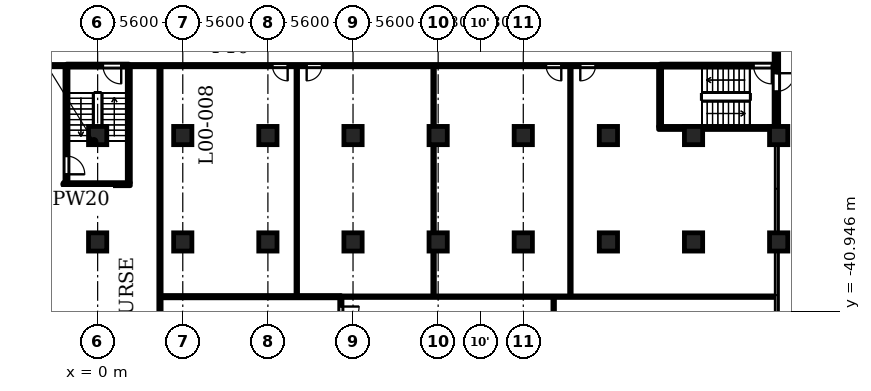
"""IFC4 building model, lengths in metres.
Left out: names, types, materials, properties, quantities, classifications, styles, units other than length and angle.
Written with IfcOpenShell. Run it as: python <this file> out.ifc"""

import sys

from ifc_helpers import new_model, si_unit, direction, frame, frame_2d, origin, origin_2d, place, context, subcontext, project, spatial, rectangle, circle, extrude, element, fill, save


model = new_model("IFC4")
c1 = context("Model", 3, precision=1e-05, world=origin(), true_north=direction((0.0, 1.0)))
c2 = subcontext(c1, "Body", "Model", "MODEL_VIEW")
j1 = project(units=[si_unit("LENGTHUNIT", "METRE"), si_unit("PLANEANGLEUNIT", "RADIAN")], contexts=[c1])
p1 = place(None, origin())
s1 = spatial("IfcSite", under=j1, at=p1, CompositionType="ELEMENT")
p2 = place(p1, origin())
s2 = spatial("IfcBuilding", under=s1, at=p2, CompositionType="ELEMENT")
p3 = place(p2, origin())
s3 = spatial("IfcBuildingStorey", under=s2, at=p3, CompositionType="ELEMENT", Elevation=0.0)
for number, where, z_axis, x_axis in (
    (1, (0.0, -29.4, 0.0), (0.0, 0.0, 1.0), (1.0, 0.0, 0.0)),
    (2, (5.6, -29.4, 0.0), (0.0, 0.0, 1.0), (1.0, 0.0, 0.0)),
    (3, (11.2, -29.4, 0.0), (0.0, 0.0, 1.0), (1.0, 0.0, 0.0)),
    (4, (16.8, -29.4, 0.0), (0.0, 0.0, 1.0), (1.0, 0.0, 0.0)),
    (5, (22.4, -29.4, 0.0), (0.0, 0.0, 1.0), (1.0, 0.0, 0.0)),
    (6, (28.0, -29.4, 0.0), (0.0, 0.0, 1.0), (1.0, 0.0, 0.0)),
    (7, (33.6, -29.4, 0.0), (0.0, 0.0, 1.0), (1.0, 0.0, 0.0)),
    (8, (39.2, -29.4, 0.0), (0.0, 0.0, 1.0), (1.0, 0.0, 0.0)),
    (9, (44.8, -29.4, 0.0), (0.0, 0.0, 1.0), (1.0, 0.0, 0.0)),
    (10, (0.0, -36.4, 0.0), (0.0, 0.0, 1.0), (1.0, 0.0, 0.0)),
    (11, (5.6, -36.4, 0.0), (0.0, 0.0, 1.0), (1.0, 0.0, 0.0)),
    (12, (11.2, -36.4, 0.0), (0.0, 0.0, 1.0), (1.0, 0.0, 0.0)),
    (13, (16.8, -36.4, 0.0), (0.0, 0.0, 1.0), (1.0, 0.0, 0.0)),
    (14, (22.4, -36.4, 0.0), (0.0, 0.0, 1.0), (1.0, 0.0, 0.0)),
    (15, (28.0, -36.4, 0.0), (0.0, 0.0, 1.0), (1.0, 0.0, 0.0)),
    (16, (33.6, -36.4, 0.0), (0.0, 0.0, 1.0), (1.0, 0.0, 0.0)),
    (17, (39.2, -36.4, 0.0), (0.0, 0.0, 1.0), (1.0, 0.0, 0.0)),
    (18, (44.8, -36.4, 0.0), (0.0, 0.0, 1.0), (1.0, 0.0, 0.0)),
):
    element("IfcColumn", number, at=place(p3, frame(where, z_axis=z_axis, x_axis=x_axis)), inside=s3, PredefinedType="COLUMN", context=c2, shape_type="SweptSolid", body=[
        extrude(circle(Radius=0.6, at=origin_2d()), origin(), (0.0, 0.0, 1.0), 6.5),
    ])
p4 = place(p3, frame((44.65, -23.0, 0.0), z_axis=(0.0, 0.0, 1.0), x_axis=(0.0, -1.0, 0.0)))
e19 = element("IfcWall", 19, at=p4, inside=s3, PredefinedType="SOLIDWALL", context=c2, shape_type="SweptSolid", body=[
    extrude(rectangle(XDim=5.8, YDim=0.3, at=frame_2d((2.9, 0.0))), origin(), (0.0, 0.0, 1.0), 5.35),
])
p5 = place(p4, frame((2.3, 0.0, 0.0)))
e20 = element("IfcOpeningElement", 20, at=p5, cuts=e19, PredefinedType="OPENING", context=c2, shape_type="SweptSolid", body=[
    extrude(rectangle(XDim=1.2, YDim=2.1, at=frame_2d((0.6, 1.05))), frame((0.0, 0.16, 0.0), z_axis=(0.0, -1.0, 0.0), x_axis=(1.0, 0.0, 0.0)), (0.0, 0.0, 1.0), 0.32),
])
p6 = place(p3, frame((16.0, -40.0, 0.0), z_axis=(0.0, 0.0, 1.0), x_axis=(1.0, 0.0, 0.0)))
e21 = element("IfcWall", 21, at=p6, inside=s3, PredefinedType="PARTITIONING", context=c2, shape_type="SweptSolid", body=[
    extrude(rectangle(XDim=28.618, YDim=0.1, at=frame_2d((14.309, 0.0))), origin(), (0.0, 0.0, 1.0), 6.15),
])
p7 = place(p3, frame((4.175, -40.0, 0.0), z_axis=(0.0, 0.0, 1.0), x_axis=(1.0, 0.0, 0.0)))
e22 = element("IfcWall", 22, at=p7, inside=s3, PredefinedType="PARTITIONING", context=c2, shape_type="SweptSolid", body=[
    extrude(rectangle(XDim=11.825, YDim=0.15, at=frame_2d((5.913, 0.0))), origin(), (0.0, 0.0, 1.0), 6.15),
])
p8 = place(p3, frame((-2.15, -32.6, 0.0), z_axis=(0.0, 0.0, 1.0), x_axis=(1.0, 0.0, 0.0)))
e23 = element("IfcWall", 23, at=p8, inside=s3, PredefinedType="SHEAR", context=c2, shape_type="SweptSolid", body=[
    extrude(rectangle(XDim=4.3, YDim=0.2, at=frame_2d((2.15, 0.0))), origin(), (0.0, 0.0, 1.0), 6.15),
])
p9 = place(p3, frame((36.9, -28.9, 0.0), z_axis=(0.0, 0.0, 1.0), x_axis=(1.0, 0.0, 0.0)))
e24 = element("IfcWall", 24, at=p9, inside=s3, PredefinedType="SHEAR", context=c2, shape_type="SweptSolid", body=[
    extrude(rectangle(XDim=7.81, YDim=0.2, at=frame_2d((3.905, 0.0))), origin(), (0.0, 0.0, 1.0), 6.15),
])
p10 = place(p3, frame((-37.0, -24.8, 0.0), z_axis=(0.0, 0.0, 1.0), x_axis=(1.0, 0.0, 0.0)))
e25 = element("IfcWall", 25, at=p10, inside=s3, PredefinedType="PARTITIONING", context=c2, shape_type="SweptSolid", body=[
    extrude(rectangle(XDim=34.95, YDim=0.15, at=frame_2d((17.475, 0.0))), origin(), (0.0, 0.0, 1.0), 6.15),
])
p11 = place(p10, frame((0.65, 0.0, 0.0)))
e26 = element("IfcOpeningElement", 26, at=p11, cuts=e25, PredefinedType="OPENING", context=c2, shape_type="SweptSolid", body=[
    extrude(rectangle(XDim=1.0, YDim=2.1, at=frame_2d((0.5, 1.05))), frame((0.0, 0.085, 0.0), z_axis=(0.0, -1.0, 0.0), x_axis=(1.0, 0.0, 0.0)), (0.0, 0.0, 1.0), 0.17),
])
p12 = place(p10, frame((12.6, 0.0, 0.0)))
e27 = element("IfcOpeningElement", 27, at=p12, cuts=e25, PredefinedType="OPENING", context=c2, shape_type="SweptSolid", body=[
    extrude(rectangle(XDim=1.0, YDim=2.1, at=frame_2d((0.5, 1.05))), frame((0.0, 0.085, 0.0), z_axis=(0.0, -1.0, 0.0), x_axis=(1.0, 0.0, 0.0)), (0.0, 0.0, 1.0), 0.17),
])
p13 = place(p10, frame((14.85, 0.0, 0.0)))
e28 = element("IfcOpeningElement", 28, at=p13, cuts=e25, PredefinedType="OPENING", context=c2, shape_type="SweptSolid", body=[
    extrude(rectangle(XDim=1.0, YDim=2.1, at=frame_2d((0.5, 1.05))), frame((0.0, 0.085, 0.0), z_axis=(0.0, -1.0, 0.0), x_axis=(1.0, 0.0, 0.0)), (0.0, 0.0, 1.0), 0.17),
])
p14 = place(p10, frame((31.35, 0.0, 0.0)))
e29 = element("IfcOpeningElement", 29, at=p14, cuts=e25, PredefinedType="OPENING", context=c2, shape_type="SweptSolid", body=[
    extrude(rectangle(XDim=1.0, YDim=2.1, at=frame_2d((0.5, 1.05))), frame((0.0, 0.085, 0.0), z_axis=(0.0, -1.0, 0.0), x_axis=(1.0, 0.0, 0.0)), (0.0, 0.0, 1.0), 0.17),
])
p15 = place(p3, frame((2.05, -24.8, 0.0), z_axis=(0.0, 0.0, 1.0), x_axis=(1.0, 0.0, 0.0)))
e30 = element("IfcWall", 30, at=p15, inside=s3, PredefinedType="PARTITIONING", context=c2, shape_type="SweptSolid", body=[
    extrude(rectangle(XDim=34.95, YDim=0.15, at=frame_2d((17.475, 0.0))), origin(), (0.0, 0.0, 1.0), 6.15),
])
p16 = place(p15, frame((9.45, 0.0, 0.0)))
e31 = element("IfcOpeningElement", 31, at=p16, cuts=e30, PredefinedType="OPENING", context=c2, shape_type="SweptSolid", body=[
    extrude(rectangle(XDim=1.0, YDim=2.1, at=frame_2d((0.5, 1.05))), frame((0.0, 0.085, 0.0), z_axis=(0.0, -1.0, 0.0), x_axis=(1.0, 0.0, 0.0)), (0.0, 0.0, 1.0), 0.17),
])
p17 = place(p15, frame((11.7, 0.0, 0.0)))
e32 = element("IfcOpeningElement", 32, at=p17, cuts=e30, PredefinedType="OPENING", context=c2, shape_type="SweptSolid", body=[
    extrude(rectangle(XDim=1.0, YDim=2.1, at=frame_2d((0.5, 1.05))), frame((0.0, 0.085, 0.0), z_axis=(0.0, -1.0, 0.0), x_axis=(1.0, 0.0, 0.0)), (0.0, 0.0, 1.0), 0.17),
])
p18 = place(p15, frame((27.45, 0.0, 0.0)))
e33 = element("IfcOpeningElement", 33, at=p18, cuts=e30, PredefinedType="OPENING", context=c2, shape_type="SweptSolid", body=[
    extrude(rectangle(XDim=1.0, YDim=2.1, at=frame_2d((0.5, 1.05))), frame((0.0, 0.085, 0.0), z_axis=(0.0, -1.0, 0.0), x_axis=(1.0, 0.0, 0.0)), (0.0, 0.0, 1.0), 0.17),
])
p19 = place(p15, frame((29.7, 0.0, 0.0)))
e34 = element("IfcOpeningElement", 34, at=p19, cuts=e30, PredefinedType="OPENING", context=c2, shape_type="SweptSolid", body=[
    extrude(rectangle(XDim=1.0, YDim=2.1, at=frame_2d((0.5, 1.05))), frame((0.0, 0.085, 0.0), z_axis=(0.0, -1.0, 0.0), x_axis=(1.0, 0.0, 0.0)), (0.0, 0.0, 1.0), 0.17),
])
p20 = place(p3, frame((-2.05, -24.8, 0.0), z_axis=(0.0, 0.0, 1.0), x_axis=(1.0, 0.0, 0.0)))
e35 = element("IfcWall", 35, at=p20, inside=s3, PredefinedType="SHEAR", context=c2, shape_type="SweptSolid", body=[
    extrude(rectangle(XDim=4.1, YDim=0.2, at=frame_2d((2.05, 0.0))), origin(), (0.0, 0.0, 1.0), 6.15),
])
p21 = place(p20, frame((2.4, 0.0, 0.0)))
e36 = element("IfcOpeningElement", 36, at=p21, cuts=e35, PredefinedType="OPENING", context=c2, shape_type="SweptSolid", body=[
    extrude(rectangle(XDim=1.2, YDim=2.1, at=frame_2d((0.6, 1.05))), frame((0.0, 0.11, 0.0), z_axis=(0.0, -1.0, 0.0), x_axis=(1.0, 0.0, 0.0)), (0.0, 0.0, 1.0), 0.22),
])
p22 = place(p3, frame((37.0, -24.8, 0.0), z_axis=(0.0, 0.0, 1.0), x_axis=(1.0, 0.0, 0.0)))
e37 = element("IfcWall", 37, at=p22, inside=s3, PredefinedType="SHEAR", context=c2, shape_type="SweptSolid", body=[
    extrude(rectangle(XDim=7.71, YDim=0.2, at=frame_2d((3.855, 0.0))), origin(), (0.0, 0.0, 1.0), 6.15),
])
p23 = place(p22, frame((6.15, 0.0, 0.0)))
e38 = element("IfcOpeningElement", 38, at=p23, cuts=e37, PredefinedType="OPENING", context=c2, shape_type="SweptSolid", body=[
    extrude(rectangle(XDim=1.2, YDim=2.1, at=frame_2d((0.6, 1.05))), frame((0.0, 0.11, 0.0), z_axis=(0.0, -1.0, 0.0), x_axis=(1.0, 0.0, 0.0)), (0.0, 0.0, 1.0), 0.22),
])
p24 = place(p3, frame((-2.05, -32.5, 0.0), z_axis=(0.0, 0.0, 1.0), x_axis=(0.0, 1.0, 0.0)))
e39 = element("IfcWall", 39, at=p24, inside=s3, PredefinedType="SHEAR", context=c2, shape_type="SweptSolid", body=[
    extrude(rectangle(XDim=7.625, YDim=0.2, at=frame_2d((3.812, 0.0))), origin(), (0.0, 0.0, 1.0), 6.15),
])
p25 = place(p24, frame((0.55, 0.0, 0.0)))
e40 = element("IfcOpeningElement", 40, at=p25, cuts=e39, PredefinedType="OPENING", context=c2, shape_type="SweptSolid", body=[
    extrude(rectangle(XDim=1.2, YDim=2.1, at=frame_2d((0.6, 1.05))), frame((0.0, 0.11, 0.0), z_axis=(0.0, -1.0, 0.0), x_axis=(1.0, 0.0, 0.0)), (0.0, 0.0, 1.0), 0.22),
])
p26 = place(p3, frame((2.05, -32.5, 0.0), z_axis=(0.0, 0.0, 1.0), x_axis=(0.0, 1.0, 0.0)))
e41 = element("IfcWall", 41, at=p26, inside=s3, PredefinedType="SHEAR", context=c2, shape_type="SweptSolid", body=[
    extrude(rectangle(XDim=7.625, YDim=0.2, at=frame_2d((3.812, 0.0))), origin(), (0.0, 0.0, 1.0), 6.15),
])
p27 = place(p3, frame((4.1, -64.08, 0.0), z_axis=(0.0, 0.0, 1.0), x_axis=(0.0, 1.0, 0.0)))
e42 = element("IfcWall", 42, at=p27, inside=s3, PredefinedType="PARTITIONING", context=c2, shape_type="SweptSolid", body=[
    extrude(rectangle(XDim=39.205, YDim=0.15, at=frame_2d((19.603, 0.0))), origin(), (0.0, 0.0, 1.0), 6.15),
])
p28 = place(p3, frame((13.1, -39.925, 0.0), z_axis=(0.0, 0.0, 1.0), x_axis=(0.0, 1.0, 0.0)))
e43 = element("IfcWall", 43, at=p28, inside=s3, PredefinedType="PARTITIONING", context=c2, shape_type="SweptSolid", body=[
    extrude(rectangle(XDim=15.05, YDim=0.1, at=frame_2d((7.525, 0.0))), origin(), (0.0, 0.0, 1.0), 6.15),
])
p29 = place(p3, frame((16.0, -64.08, 0.0), z_axis=(0.0, 0.0, 1.0), x_axis=(0.0, 1.0, 0.0)))
e44 = element("IfcWall", 44, at=p29, inside=s3, PredefinedType="PARTITIONING", context=c2, shape_type="SweptSolid", body=[
    extrude(rectangle(XDim=24.03, YDim=0.15, at=frame_2d((12.015, 0.0))), origin(), (0.0, 0.0, 1.0), 6.15),
])
p30 = place(p29, frame((0.42, 0.0, 0.0)))
e45 = element("IfcOpeningElement", 45, at=p30, cuts=e44, PredefinedType="OPENING", context=c2, shape_type="SweptSolid", body=[
    extrude(rectangle(XDim=1.8, YDim=2.1, at=frame_2d((0.9, 1.05))), frame((0.0, 0.085, 0.0), z_axis=(0.0, -1.0, 0.0), x_axis=(1.0, 0.0, 0.0)), (0.0, 0.0, 1.0), 0.17),
])
p31 = place(p29, frame((22.23, 0.0, 0.0)))
e46 = element("IfcOpeningElement", 46, at=p31, cuts=e44, PredefinedType="OPENING", context=c2, shape_type="SweptSolid", body=[
    extrude(rectangle(XDim=1.2, YDim=2.1, at=frame_2d((0.6, 1.05))), frame((0.0, 0.085, 0.0), z_axis=(0.0, -1.0, 0.0), x_axis=(1.0, 0.0, 0.0)), (0.0, 0.0, 1.0), 0.17),
])
p32 = place(p3, frame((22.1, -39.95, 0.0), z_axis=(0.0, 0.0, 1.0), x_axis=(0.0, 1.0, 0.0)))
e47 = element("IfcWall", 47, at=p32, inside=s3, PredefinedType="PARTITIONING", context=c2, shape_type="SweptSolid", body=[
    extrude(rectangle(XDim=15.075, YDim=0.1, at=frame_2d((7.538, 0.0))), origin(), (0.0, 0.0, 1.0), 6.15),
])
p33 = place(p3, frame((30.0, -64.218, 0.0), z_axis=(0.0, 0.0, 1.0), x_axis=(0.0, 1.0, 0.0)))
e48 = element("IfcWall", 48, at=p33, inside=s3, PredefinedType="PARTITIONING", context=c2, shape_type="SweptSolid", body=[
    extrude(rectangle(XDim=24.168, YDim=0.1, at=frame_2d((12.084, 0.0))), origin(), (0.0, 0.0, 1.0), 6.15),
])
p34 = place(p33, frame((0.558, 0.0, 0.0)))
e49 = element("IfcOpeningElement", 49, at=p34, cuts=e48, PredefinedType="OPENING", context=c2, shape_type="SweptSolid", body=[
    extrude(rectangle(XDim=1.8, YDim=2.1, at=frame_2d((0.9, 1.05))), frame((0.0, 0.06, 0.0), z_axis=(0.0, -1.0, 0.0), x_axis=(1.0, 0.0, 0.0)), (0.0, 0.0, 1.0), 0.12),
])
p35 = place(p3, frame((31.1, -39.95, 0.0), z_axis=(0.0, 0.0, 1.0), x_axis=(0.0, 1.0, 0.0)))
e50 = element("IfcWall", 50, at=p35, inside=s3, PredefinedType="PARTITIONING", context=c2, shape_type="SweptSolid", body=[
    extrude(rectangle(XDim=15.075, YDim=0.1, at=frame_2d((7.538, 0.0))), origin(), (0.0, 0.0, 1.0), 6.15),
])
p36 = place(p3, frame((37.0, -28.8, 0.0), z_axis=(0.0, 0.0, 1.0), x_axis=(0.0, 1.0, 0.0)))
e51 = element("IfcWall", 51, at=p36, inside=s3, PredefinedType="SHEAR", context=c2, shape_type="SweptSolid", body=[
    extrude(rectangle(XDim=3.925, YDim=0.2, at=frame_2d((1.962, 0.0))), origin(), (0.0, 0.0, 1.0), 6.15),
])
p37 = place(p5, origin())
e52 = element("IfcDoor", 52, at=p37, inside=s3, OperationType="SINGLE_SWING_LEFT", PredefinedType="DOOR", context=c2, shape_type="SweptSolid", body=[
    extrude(rectangle(XDim=1.2, YDim=2.1, at=frame_2d((0.6, 1.05))), frame((0.0, 0.025, 0.0), z_axis=(0.0, -1.0, 0.0), x_axis=(1.0, 0.0, 0.0)), (0.0, 0.0, 1.0), 0.05),
])
fill(e20, e52)
p38 = place(p23, origin())
e53 = element("IfcDoor", 53, at=p38, inside=s3, OperationType="SINGLE_SWING_RIGHT", PredefinedType="DOOR", context=c2, shape_type="SweptSolid", body=[
    extrude(rectangle(XDim=1.2, YDim=2.1, at=frame_2d((0.6, 1.05))), frame((0.0, 0.025, 0.0), z_axis=(0.0, -1.0, 0.0), x_axis=(1.0, 0.0, 0.0)), (0.0, 0.0, 1.0), 0.05),
])
fill(e38, e53)
p39 = place(p21, origin())
e54 = element("IfcDoor", 54, at=p39, inside=s3, OperationType="SINGLE_SWING_RIGHT", PredefinedType="DOOR", context=c2, shape_type="SweptSolid", body=[
    extrude(rectangle(XDim=1.2, YDim=2.1, at=frame_2d((0.6, 1.05))), frame((0.0, 0.025, 0.0), z_axis=(0.0, -1.0, 0.0), x_axis=(1.0, 0.0, 0.0)), (0.0, 0.0, 1.0), 0.05),
])
fill(e36, e54)
p40 = place(p25, origin())
e55 = element("IfcDoor", 55, at=p40, inside=s3, OperationType="SINGLE_SWING_LEFT", PredefinedType="DOOR", context=c2, shape_type="SweptSolid", body=[
    extrude(rectangle(XDim=1.2, YDim=2.1, at=frame_2d((0.6, 1.05))), frame((0.0, 0.025, 0.0), z_axis=(0.0, -1.0, 0.0), x_axis=(1.0, 0.0, 0.0)), (0.0, 0.0, 1.0), 0.05),
])
fill(e40, e55)
p41 = place(p31, origin())
e56 = element("IfcDoor", 56, at=p41, inside=s3, OperationType="SINGLE_SWING_RIGHT", PredefinedType="DOOR", context=c2, shape_type="SweptSolid", body=[
    extrude(rectangle(XDim=1.2, YDim=2.1, at=frame_2d((0.6, 1.05))), frame((0.0, 0.025, 0.0), z_axis=(0.0, -1.0, 0.0), x_axis=(1.0, 0.0, 0.0)), (0.0, 0.0, 1.0), 0.05),
])
fill(e46, e56)
p42 = place(p16, origin())
e57 = element("IfcDoor", 57, at=p42, inside=s3, OperationType="SINGLE_SWING_RIGHT", PredefinedType="DOOR", context=c2, shape_type="SweptSolid", body=[
    extrude(rectangle(XDim=1.0, YDim=2.1, at=frame_2d((0.5, 1.05))), frame((0.0, 0.025, 0.0), z_axis=(0.0, -1.0, 0.0), x_axis=(1.0, 0.0, 0.0)), (0.0, 0.0, 1.0), 0.05),
])
fill(e31, e57)
p43 = place(p17, origin())
e58 = element("IfcDoor", 58, at=p43, inside=s3, OperationType="SINGLE_SWING_LEFT", PredefinedType="DOOR", context=c2, shape_type="SweptSolid", body=[
    extrude(rectangle(XDim=1.0, YDim=2.1, at=frame_2d((0.5, 1.05))), frame((0.0, 0.025, 0.0), z_axis=(0.0, -1.0, 0.0), x_axis=(1.0, 0.0, 0.0)), (0.0, 0.0, 1.0), 0.05),
])
fill(e32, e58)
p44 = place(p18, origin())
e59 = element("IfcDoor", 59, at=p44, inside=s3, OperationType="SINGLE_SWING_RIGHT", PredefinedType="DOOR", context=c2, shape_type="SweptSolid", body=[
    extrude(rectangle(XDim=1.0, YDim=2.1, at=frame_2d((0.5, 1.05))), frame((0.0, 0.025, 0.0), z_axis=(0.0, -1.0, 0.0), x_axis=(1.0, 0.0, 0.0)), (0.0, 0.0, 1.0), 0.05),
])
fill(e33, e59)
p45 = place(p19, origin())
e60 = element("IfcDoor", 60, at=p45, inside=s3, OperationType="SINGLE_SWING_LEFT", PredefinedType="DOOR", context=c2, shape_type="SweptSolid", body=[
    extrude(rectangle(XDim=1.0, YDim=2.1, at=frame_2d((0.5, 1.05))), frame((0.0, 0.025, 0.0), z_axis=(0.0, -1.0, 0.0), x_axis=(1.0, 0.0, 0.0)), (0.0, 0.0, 1.0), 0.05),
])
fill(e34, e60)
save(model, sys.argv[1])
